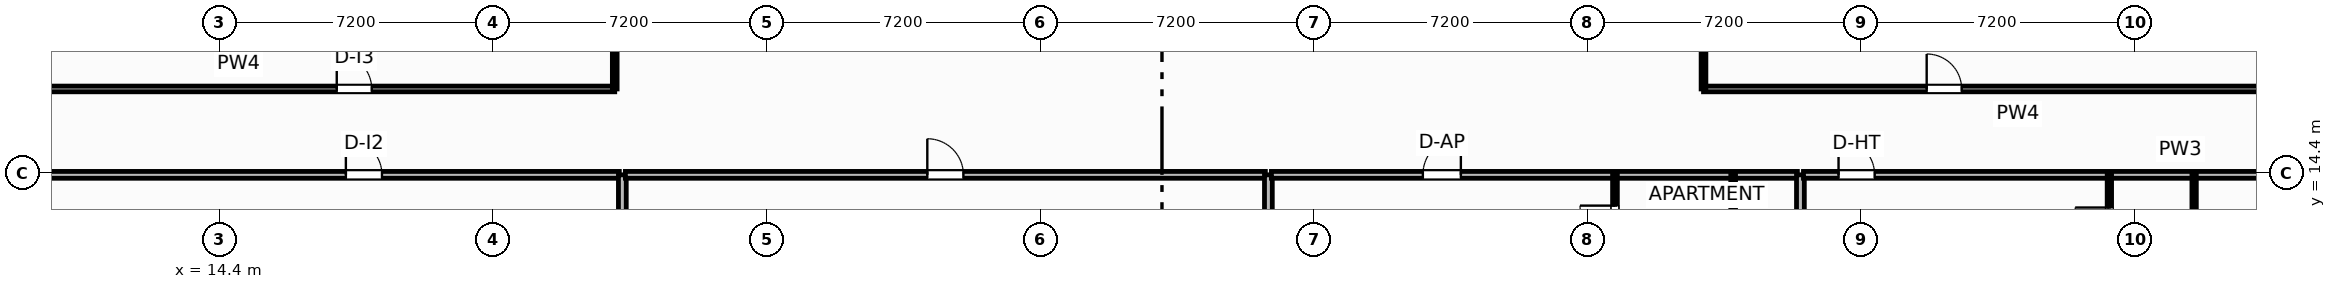
"""IFC4 building model, lengths in metres.
Left out: names, types, materials, properties, quantities, classifications, styles, units other than length and angle.
Written with IfcOpenShell. Run it as: python <this file> out.ifc"""

import sys

from ifc_helpers import new_model, si_unit, direction, frame, frame_2d, origin, place, context, subcontext, project, spatial, rectangle, extrude, element, fill, save


model = new_model("IFC4")
c1 = context("Model", 3, precision=1e-05, world=origin(), true_north=direction((0.0, 1.0)))
c2 = subcontext(c1, "Body", "Model", "MODEL_VIEW")
j1 = project(units=[si_unit("LENGTHUNIT", "METRE"), si_unit("PLANEANGLEUNIT", "RADIAN")], contexts=[c1])
p1 = place(None, origin())
s1 = spatial("IfcSite", under=j1, at=p1, CompositionType="ELEMENT")
p2 = place(p1, origin())
s2 = spatial("IfcBuilding", under=s1, at=p2, CompositionType="ELEMENT")
p3 = place(p2, frame((0.0, 0.0, 182.0)))
s3 = spatial("IfcBuildingStorey", under=s2, at=p3, CompositionType="ELEMENT", Elevation=182.0)
p4 = place(p3, frame((5.0, 16.61, 0.0), z_axis=(0.0, 0.0, 1.0), x_axis=(1.0, 0.0, 0.0)))
e1 = element("IfcWall", 1, at=p4, inside=s3, PredefinedType="PARTITIONING", context=c2, shape_type="SweptSolid", body=[
    extrude(rectangle(XDim=19.8, YDim=0.15, at=frame_2d((9.9, 0.0))), origin(), (0.0, 0.0, 1.0), 3.45),
])
p5 = place(p4, frame((12.485, 0.0, 0.0)))
e2 = element("IfcOpeningElement", 2, at=p5, cuts=e1, PredefinedType="OPENING", context=c2, shape_type="SweptSolid", body=[
    extrude(rectangle(XDim=0.92, YDim=2.05, at=frame_2d((0.46, 1.025))), frame((0.0, 0.085, 0.0), z_axis=(0.0, -1.0, 0.0), x_axis=(1.0, 0.0, 0.0)), (0.0, 0.0, 1.0), 0.17),
])
p6 = place(p3, frame((24.8, 16.61, 0.0), z_axis=(0.0, 0.0, 1.0), x_axis=(0.0, 1.0, 0.0)))
e3 = element("IfcWall", 3, at=p6, inside=s3, PredefinedType="PARTITIONING", context=c2, shape_type="SweptSolid", body=[
    extrude(rectangle(XDim=2.63, YDim=0.125, at=frame_2d((1.315, 0.0))), origin(), (0.0, 0.0, 1.0), 3.45),
])
p7 = place(p3, frame((53.45, 16.61, 0.0), z_axis=(0.0, 0.0, 1.0), x_axis=(1.0, 0.0, 0.0)))
e4 = element("IfcWall", 4, at=p7, inside=s3, PredefinedType="PARTITIONING", context=c2, shape_type="SweptSolid", body=[
    extrude(rectangle(XDim=16.55, YDim=0.15, at=frame_2d((8.275, 0.0))), origin(), (0.0, 0.0, 1.0), 3.45),
])
p8 = place(p7, frame((5.873, 0.0, 0.0)))
e5 = element("IfcOpeningElement", 5, at=p8, cuts=e4, PredefinedType="OPENING", context=c2, shape_type="SweptSolid", body=[
    extrude(rectangle(XDim=0.92, YDim=2.05, at=frame_2d((0.46, 1.025))), frame((0.0, 0.085, 0.0), z_axis=(0.0, -1.0, 0.0), x_axis=(1.0, 0.0, 0.0)), (0.0, 0.0, 1.0), 0.17),
])
p9 = place(p3, frame((53.45, 16.61, 0.0), z_axis=(0.0, 0.0, 1.0), x_axis=(0.0, 1.0, 0.0)))
e6 = element("IfcWall", 6, at=p9, inside=s3, PredefinedType="PARTITIONING", context=c2, shape_type="SweptSolid", body=[
    extrude(rectangle(XDim=2.63, YDim=0.125, at=frame_2d((1.315, 0.0))), origin(), (0.0, 0.0, 1.0), 2.662),
])
p10 = place(p3, frame((5.15, 14.35, 0.0), z_axis=(0.0, 0.0, 1.0), x_axis=(1.0, 0.0, 0.0)))
e7 = element("IfcWall", 7, at=p10, inside=s3, PredefinedType="PARTITIONING", context=c2, shape_type="SweptSolid", body=[
    extrude(rectangle(XDim=19.77, YDim=0.18, at=frame_2d((9.885, 0.0))), origin(), (0.0, 0.0, 1.0), 3.45),
])
p11 = place(p10, frame((12.575, 0.0, 0.0)))
e8 = element("IfcOpeningElement", 8, at=p11, cuts=e7, PredefinedType="OPENING", context=c2, shape_type="SweptSolid", body=[
    extrude(rectangle(XDim=0.95, YDim=2.05, at=frame_2d((0.475, 1.025))), frame((0.0, 0.1, 0.0), z_axis=(0.0, -1.0, 0.0), x_axis=(1.0, 0.0, 0.0)), (0.0, 0.0, 1.0), 0.2),
])
p12 = place(p3, frame((25.0, 3.775, 0.0), z_axis=(0.0, 0.0, 1.0), x_axis=(0.0, 1.0, 0.0)))
e9 = element("IfcWall", 9, at=p12, inside=s3, PredefinedType="PARTITIONING", context=c2, shape_type="SweptSolid", body=[
    extrude(rectangle(XDim=10.575, YDim=0.205, at=frame_2d((5.288, 0.0))), origin(), (0.0, 0.0, 1.0), 3.45),
])
p13 = place(p3, frame((25.08, 14.35, 0.0), z_axis=(0.0, 0.0, 1.0), x_axis=(1.0, 0.0, 0.0)))
e10 = element("IfcWall", 10, at=p13, inside=s3, PredefinedType="PARTITIONING", context=c2, shape_type="SweptSolid", body=[
    extrude(rectangle(XDim=16.84, YDim=0.18, at=frame_2d((8.42, 0.0))), origin(), (0.0, 0.0, 1.0), 3.45),
])
p14 = place(p13, frame((7.945, 0.0, 0.0)))
e11 = element("IfcOpeningElement", 11, at=p14, cuts=e10, PredefinedType="OPENING", context=c2, shape_type="SweptSolid", body=[
    extrude(rectangle(XDim=0.95, YDim=2.05, at=frame_2d((0.475, 1.025))), frame((0.0, 0.1, 0.0), z_axis=(0.0, -1.0, 0.0), x_axis=(1.0, 0.0, 0.0)), (0.0, 0.0, 1.0), 0.2),
])
p15 = place(p3, frame((42.0, 5.835, 0.0), z_axis=(0.0, 0.0, 1.0), x_axis=(0.0, 1.0, 0.0)))
e12 = element("IfcWall", 12, at=p15, inside=s3, PredefinedType="PARTITIONING", context=c2, shape_type="SweptSolid", body=[
    extrude(rectangle(XDim=8.515, YDim=0.205, at=frame_2d((4.257, 0.0))), origin(), (0.0, 0.0, 1.0), 2.662),
])
p16 = place(p3, frame((42.08, 14.35, 0.0), z_axis=(0.0, 0.0, 1.0), x_axis=(1.0, 0.0, 0.0)))
e13 = element("IfcWall", 13, at=p16, inside=s3, PredefinedType="PARTITIONING", context=c2, shape_type="SweptSolid", body=[
    extrude(rectangle(XDim=13.84, YDim=0.18, at=frame_2d((6.92, 0.0))), origin(), (0.0, 0.0, 1.0), 3.45),
])
p17 = place(p16, frame((3.985, 0.0, 0.0)))
e14 = element("IfcOpeningElement", 14, at=p17, cuts=e13, PredefinedType="OPENING", context=c2, shape_type="SweptSolid", body=[
    extrude(rectangle(XDim=1.0, YDim=2.2, at=frame_2d((0.5, 1.1))), frame((0.0, 0.1, 0.0), z_axis=(0.0, -1.0, 0.0), x_axis=(1.0, 0.0, 0.0)), (0.0, 0.0, 1.0), 0.2),
])
p18 = place(p3, frame((51.12, 4.826, 0.0), z_axis=(0.0, 0.0, 1.0), x_axis=(0.0, 1.0, 0.0)))
e15 = element("IfcWall", 15, at=p18, inside=s3, PredefinedType="PARTITIONING", context=c2, shape_type="SweptSolid", body=[
    extrude(rectangle(XDim=9.524, YDim=0.125, at=frame_2d((4.762, 0.0))), origin(), (0.0, 0.0, 1.0), 2.662),
])
p19 = place(p18, frame((0.725, 0.0, 0.0)))
e16 = element("IfcOpeningElement", 16, at=p19, cuts=e15, PredefinedType="OPENING", context=c2, shape_type="SweptSolid", body=[
    extrude(rectangle(XDim=0.92, YDim=2.05, at=frame_2d((0.46, 1.025))), frame((0.0, 0.073, 0.0), z_axis=(0.0, -1.0, 0.0), x_axis=(1.0, 0.0, 0.0)), (0.0, 0.0, 1.0), 0.145),
])
p20 = place(p18, frame((5.502, 0.0, 0.0)))
e17 = element("IfcOpeningElement", 17, at=p20, cuts=e15, PredefinedType="OPENING", context=c2, shape_type="SweptSolid", body=[
    extrude(rectangle(XDim=0.9, YDim=2.05, at=frame_2d((0.45, 1.025))), frame((0.0, 0.073, 0.0), z_axis=(0.0, -1.0, 0.0), x_axis=(1.0, 0.0, 0.0)), (0.0, 0.0, 1.0), 0.145),
])
p21 = place(p18, frame((7.794, 0.0, 0.0)))
e18 = element("IfcOpeningElement", 18, at=p21, cuts=e15, PredefinedType="OPENING", context=c2, shape_type="SweptSolid", body=[
    extrude(rectangle(XDim=0.92, YDim=2.05, at=frame_2d((0.46, 1.025))), frame((0.0, 0.073, 0.0), z_axis=(0.0, -1.0, 0.0), x_axis=(1.0, 0.0, 0.0)), (0.0, 0.0, 1.0), 0.145),
])
p22 = place(p3, frame((54.23, 11.94, 0.0), z_axis=(0.0, 0.0, 1.0), x_axis=(0.0, 1.0, 0.0)))
e19 = element("IfcWall", 19, at=p22, inside=s3, PredefinedType="PARTITIONING", context=c2, shape_type="SweptSolid", body=[
    extrude(rectangle(XDim=2.41, YDim=0.125, at=frame_2d((1.205, 0.0))), origin(), (0.0, 0.0, 1.0), 3.45),
])
p23 = place(p3, frame((56.0, 7.533, 0.0), z_axis=(0.0, 0.0, 1.0), x_axis=(0.0, 1.0, 0.0)))
e20 = element("IfcWall", 20, at=p23, inside=s3, PredefinedType="PARTITIONING", context=c2, shape_type="SweptSolid", body=[
    extrude(rectangle(XDim=6.817, YDim=0.205, at=frame_2d((3.409, 0.0))), origin(), (0.0, 0.0, 1.0), 3.45),
])
p24 = place(p3, frame((56.08, 14.35, 0.0), z_axis=(0.0, 0.0, 1.0), x_axis=(1.0, 0.0, 0.0)))
e21 = element("IfcWall", 21, at=p24, inside=s3, PredefinedType="PARTITIONING", context=c2, shape_type="SweptSolid", body=[
    extrude(rectangle(XDim=19.825, YDim=0.18, at=frame_2d((9.912, 0.0))), origin(), (0.0, 0.0, 1.0), 3.45),
])
p25 = place(p24, frame((0.923, 0.0, 0.0)))
e22 = element("IfcOpeningElement", 22, at=p25, cuts=e21, PredefinedType="OPENING", context=c2, shape_type="SweptSolid", body=[
    extrude(rectangle(XDim=0.95, YDim=2.15, at=frame_2d((0.475, 1.075))), frame((0.0, 0.1, 0.0), z_axis=(0.0, -1.0, 0.0), x_axis=(1.0, 0.0, 0.0)), (0.0, 0.0, 1.0), 0.2),
])
p26 = place(p3, frame((64.13, 11.83, 0.0), z_axis=(0.0, 0.0, 1.0), x_axis=(0.0, 1.0, 0.0)))
e23 = element("IfcWall", 23, at=p26, inside=s3, PredefinedType="PARTITIONING", context=c2, shape_type="SweptSolid", body=[
    extrude(rectangle(XDim=2.52, YDim=0.115, at=frame_2d((1.26, 0.0))), origin(), (0.0, 0.0, 1.0), 3.45),
])
p27 = place(p26, frame((0.76, 0.0, 0.0)))
e24 = element("IfcOpeningElement", 24, at=p27, cuts=e23, PredefinedType="OPENING", context=c2, shape_type="SweptSolid", body=[
    extrude(rectangle(XDim=0.9, YDim=2.05, at=frame_2d((0.45, 1.025))), frame((0.0, 0.067, 0.0), z_axis=(0.0, -1.0, 0.0), x_axis=(1.0, 0.0, 0.0)), (0.0, 0.0, 1.0), 0.135),
])
p28 = place(p3, frame((66.36, 11.83, 0.0), z_axis=(0.0, 0.0, 1.0), x_axis=(0.0, 1.0, 0.0)))
e25 = element("IfcWall", 25, at=p28, inside=s3, PredefinedType="PARTITIONING", context=c2, shape_type="SweptSolid", body=[
    extrude(rectangle(XDim=2.52, YDim=0.115, at=frame_2d((1.26, 0.0))), origin(), (0.0, 0.0, 1.0), 3.45),
])
p29 = place(p5, origin())
e26 = element("IfcDoor", 26, at=p29, inside=s3, OperationType="SINGLE_SWING_LEFT", PredefinedType="DOOR", context=c2, shape_type="SweptSolid", body=[
    extrude(rectangle(XDim=0.92, YDim=2.05, at=frame_2d((0.46, 1.025))), frame((0.0, 0.025, 0.0), z_axis=(0.0, -1.0, 0.0), x_axis=(1.0, 0.0, 0.0)), (0.0, 0.0, 1.0), 0.05),
])
fill(e2, e26)
p30 = place(p8, origin())
e27 = element("IfcDoor", 27, at=p30, inside=s3, OperationType="SINGLE_SWING_LEFT", PredefinedType="DOOR", context=c2, shape_type="SweptSolid", body=[
    extrude(rectangle(XDim=0.92, YDim=2.05, at=frame_2d((0.46, 1.025))), frame((0.0, 0.025, 0.0), z_axis=(0.0, -1.0, 0.0), x_axis=(1.0, 0.0, 0.0)), (0.0, 0.0, 1.0), 0.05),
])
fill(e5, e27)
p31 = place(p11, origin())
e28 = element("IfcDoor", 28, at=p31, inside=s3, OperationType="SINGLE_SWING_LEFT", PredefinedType="DOOR", context=c2, shape_type="SweptSolid", body=[
    extrude(rectangle(XDim=0.95, YDim=2.05, at=frame_2d((0.475, 1.025))), frame((0.0, 0.025, 0.0), z_axis=(0.0, -1.0, 0.0), x_axis=(1.0, 0.0, 0.0)), (0.0, 0.0, 1.0), 0.05),
])
fill(e8, e28)
p32 = place(p14, origin())
e29 = element("IfcDoor", 29, at=p32, inside=s3, OperationType="SINGLE_SWING_LEFT", PredefinedType="DOOR", context=c2, shape_type="SweptSolid", body=[
    extrude(rectangle(XDim=0.95, YDim=2.05, at=frame_2d((0.475, 1.025))), frame((0.0, 0.025, 0.0), z_axis=(0.0, -1.0, 0.0), x_axis=(1.0, 0.0, 0.0)), (0.0, 0.0, 1.0), 0.05),
])
fill(e11, e29)
p33 = place(p17, origin())
e30 = element("IfcDoor", 30, at=p33, inside=s3, OperationType="SINGLE_SWING_RIGHT", PredefinedType="DOOR", context=c2, shape_type="SweptSolid", body=[
    extrude(rectangle(XDim=1.0, YDim=2.2, at=frame_2d((0.5, 1.1))), frame((0.0, 0.025, 0.0), z_axis=(0.0, -1.0, 0.0), x_axis=(1.0, 0.0, 0.0)), (0.0, 0.0, 1.0), 0.05),
])
fill(e14, e30)
p34 = place(p21, origin())
e31 = element("IfcDoor", 31, at=p34, inside=s3, OperationType="SINGLE_SWING_RIGHT", PredefinedType="DOOR", context=c2, shape_type="SweptSolid", body=[
    extrude(rectangle(XDim=0.92, YDim=2.05, at=frame_2d((0.46, 1.025))), frame((0.0, 0.025, 0.0), z_axis=(0.0, -1.0, 0.0), x_axis=(1.0, 0.0, 0.0)), (0.0, 0.0, 1.0), 0.05),
])
fill(e18, e31)
p35 = place(p25, origin())
e32 = element("IfcDoor", 32, at=p35, inside=s3, OperationType="SINGLE_SWING_LEFT", PredefinedType="DOOR", context=c2, shape_type="SweptSolid", body=[
    extrude(rectangle(XDim=0.95, YDim=2.15, at=frame_2d((0.475, 1.075))), frame((0.0, 0.025, 0.0), z_axis=(0.0, -1.0, 0.0), x_axis=(1.0, 0.0, 0.0)), (0.0, 0.0, 1.0), 0.05),
])
fill(e22, e32)
p36 = place(p27, origin())
e33 = element("IfcDoor", 33, at=p36, inside=s3, OperationType="SINGLE_SWING_RIGHT", PredefinedType="DOOR", context=c2, shape_type="SweptSolid", body=[
    extrude(rectangle(XDim=0.9, YDim=2.05, at=frame_2d((0.45, 1.025))), frame((0.0, 0.025, 0.0), z_axis=(0.0, -1.0, 0.0), x_axis=(1.0, 0.0, 0.0)), (0.0, 0.0, 1.0), 0.05),
])
fill(e24, e33)
save(model, sys.argv[1])
